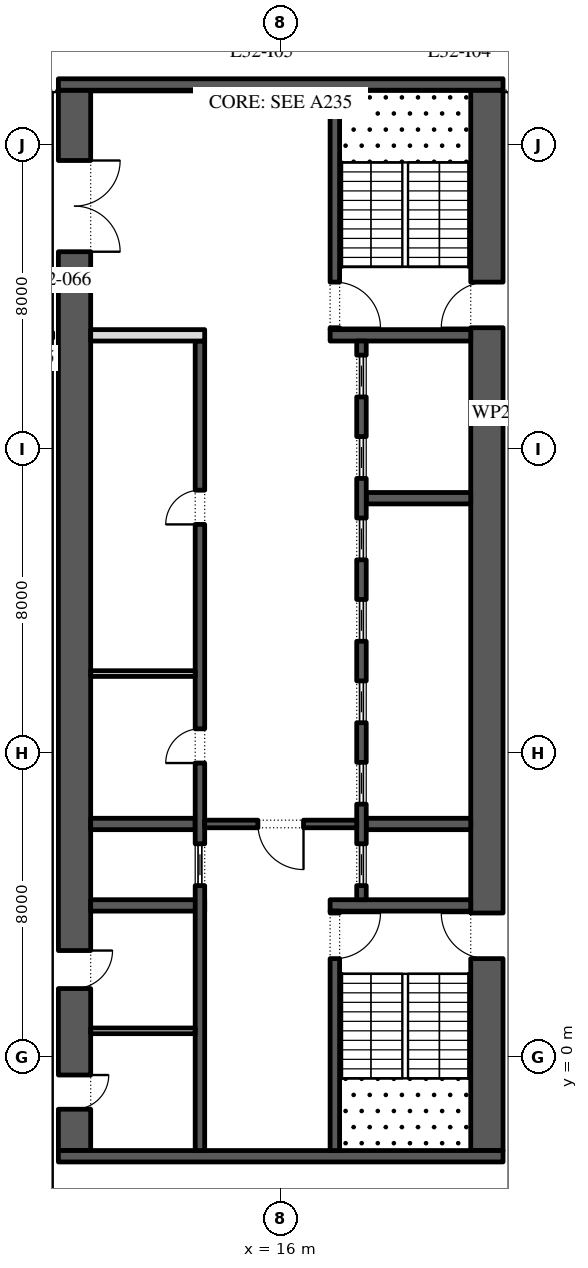
"""IFC4 building model, lengths in metres.
Left out: names, types, materials, properties, quantities, classifications, styles, units other than length and angle.
Written with IfcOpenShell. Run it as: python <this file> out.ifc"""

import sys

from ifc_helpers import new_model, si_unit, direction, frame, frame_2d, origin, place, context, subcontext, project, spatial, rectangle, extrude, element, fill, save


model = new_model("IFC4")
c1 = context("Model", 3, precision=1e-05, world=origin(), true_north=direction((0.0, 1.0)))
c2 = subcontext(c1, "Body", "Model", "MODEL_VIEW")
j1 = project(units=[si_unit("LENGTHUNIT", "METRE"), si_unit("PLANEANGLEUNIT", "RADIAN")], contexts=[c1])
p1 = place(None, origin())
s1 = spatial("IfcSite", under=j1, at=p1, CompositionType="ELEMENT")
p2 = place(p1, origin())
s2 = spatial("IfcBuilding", under=s1, at=p2, CompositionType="ELEMENT")
p3 = place(p2, frame((0.0, 0.0, 147.6)))
s3 = spatial("IfcBuildingStorey", under=s2, at=p3, CompositionType="ELEMENT", Elevation=147.6)
p4 = place(p3, frame((21.425, -2.45, 0.0), z_axis=(0.0, 0.0, 1.0), x_axis=(0.0, 1.0, 0.0)))
e1 = element("IfcWall", 1, at=p4, inside=s3, PredefinedType="SHEAR", context=c2, shape_type="SweptSolid", body=[
    extrude(rectangle(XDim=27.9, YDim=0.85, at=frame_2d((13.95, 0.0))), origin(), (0.0, 0.0, 1.0), 4.0),
])
p5 = place(p4, frame((5.05, 0.0, 0.0)))
e2 = element("IfcOpeningElement", 2, at=p5, cuts=e1, PredefinedType="OPENING", context=c2, shape_type="SweptSolid", body=[
    extrude(rectangle(XDim=1.2, YDim=2.1, at=frame_2d((0.6, 1.05))), frame((0.0, 0.435, 0.0), z_axis=(0.0, -1.0, 0.0), x_axis=(1.0, 0.0, 0.0)), (0.0, 0.0, 1.0), 0.87),
])
p6 = place(p4, frame((21.65, 0.0, 0.0)))
e3 = element("IfcOpeningElement", 3, at=p6, cuts=e1, PredefinedType="OPENING", context=c2, shape_type="SweptSolid", body=[
    extrude(rectangle(XDim=1.2, YDim=2.1, at=frame_2d((0.6, 1.05))), frame((0.0, 0.435, 0.0), z_axis=(0.0, -1.0, 0.0), x_axis=(1.0, 0.0, 0.0)), (0.0, 0.0, 1.0), 0.87),
])
p7 = place(p3, frame((10.575, -2.45, 0.0), z_axis=(0.0, 0.0, 1.0), x_axis=(0.0, 1.0, 0.0)))
e4 = element("IfcWall", 4, at=p7, inside=s3, PredefinedType="SHEAR", context=c2, shape_type="SweptSolid", body=[
    extrude(rectangle(XDim=27.9, YDim=0.85, at=frame_2d((13.95, 0.0))), origin(), (0.0, 0.0, 1.0), 4.0),
])
p8 = place(p7, frame((23.65, 0.0, 0.0)))
e5 = element("IfcOpeningElement", 5, at=p8, cuts=e4, PredefinedType="OPENING", context=c2, shape_type="SweptSolid", body=[
    extrude(rectangle(XDim=2.4, YDim=2.1, at=frame_2d((1.2, 1.05))), frame((0.0, 0.435, 0.0), z_axis=(0.0, -1.0, 0.0), x_axis=(1.0, 0.0, 0.0)), (0.0, 0.0, 1.0), 0.87),
])
p9 = place(p7, frame((1.087, 0.0, 0.0)))
e6 = element("IfcOpeningElement", 6, at=p9, cuts=e4, PredefinedType="OPENING", context=c2, shape_type="SweptSolid", body=[
    extrude(rectangle(XDim=0.9, YDim=2.1, at=frame_2d((0.45, 1.05))), frame((0.0, 0.435, 0.0), z_axis=(0.0, -1.0, 0.0), x_axis=(1.0, 0.0, 0.0)), (0.0, 0.0, 1.0), 0.87),
])
p10 = place(p7, frame((4.262, 0.0, 0.0)))
e7 = element("IfcOpeningElement", 7, at=p10, cuts=e4, PredefinedType="OPENING", context=c2, shape_type="SweptSolid", body=[
    extrude(rectangle(XDim=1.0, YDim=2.1, at=frame_2d((0.5, 1.05))), frame((0.0, 0.435, 0.0), z_axis=(0.0, -1.0, 0.0), x_axis=(1.0, 0.0, 0.0)), (0.0, 0.0, 1.0), 0.87),
])
for number, where, z_axis, x_axis in (
    (8, (10.15, -2.6, 0.0), (0.0, 0.0, 1.0), (1.0, 0.0, 0.0)),
    (9, (10.15, 25.6, 0.0), (0.0, 0.0, 1.0), (1.0, 0.0, 0.0)),
):
    element("IfcWall", number, at=place(p3, frame(where, z_axis=z_axis, x_axis=x_axis)), inside=s3, PredefinedType="SHEAR", context=c2, shape_type="SweptSolid", body=[
        extrude(rectangle(XDim=11.7, YDim=0.3, at=frame_2d((5.85, 0.0))), origin(), (0.0, 0.0, 1.0), 4.0),
    ])
p11 = place(p3, frame((17.3, 4.0, 0.0), z_axis=(0.0, 0.0, 1.0), x_axis=(1.0, 0.0, 0.0)))
e10 = element("IfcWall", 10, at=p11, inside=s3, PredefinedType="SHEAR", context=c2, shape_type="SweptSolid", body=[
    extrude(rectangle(XDim=3.7, YDim=0.3, at=frame_2d((1.85, 0.0))), origin(), (0.0, 0.0, 1.0), 4.0),
])
p12 = place(p3, frame((17.425, -2.45, 0.0), z_axis=(0.0, 0.0, 1.0), x_axis=(0.0, 1.0, 0.0)))
e11 = element("IfcWall", 11, at=p12, inside=s3, PredefinedType="SHEAR", context=c2, shape_type="SweptSolid", body=[
    extrude(rectangle(XDim=6.3, YDim=0.25, at=frame_2d((3.15, 0.0))), origin(), (0.0, 0.0, 1.0), 4.0),
])
p13 = place(p12, frame((5.05, 0.0, 0.0)))
e12 = element("IfcOpeningElement", 12, at=p13, cuts=e11, PredefinedType="OPENING", context=c2, shape_type="SweptSolid", body=[
    extrude(rectangle(XDim=1.2, YDim=2.1, at=frame_2d((0.6, 1.05))), frame((0.0, 0.135, 0.0), z_axis=(0.0, -1.0, 0.0), x_axis=(1.0, 0.0, 0.0)), (0.0, 0.0, 1.0), 0.27),
])
p14 = place(p3, frame((17.3, 19.0, 0.0), z_axis=(0.0, 0.0, 1.0), x_axis=(1.0, 0.0, 0.0)))
e13 = element("IfcWall", 13, at=p14, inside=s3, PredefinedType="SHEAR", context=c2, shape_type="SweptSolid", body=[
    extrude(rectangle(XDim=3.7, YDim=0.3, at=frame_2d((1.85, 0.0))), origin(), (0.0, 0.0, 1.0), 4.0),
])
p15 = place(p3, frame((17.425, 19.15, 0.0), z_axis=(0.0, 0.0, 1.0), x_axis=(0.0, 1.0, 0.0)))
e14 = element("IfcWall", 14, at=p15, inside=s3, PredefinedType="SHEAR", context=c2, shape_type="SweptSolid", body=[
    extrude(rectangle(XDim=6.3, YDim=0.25, at=frame_2d((3.15, 0.0))), origin(), (0.0, 0.0, 1.0), 4.0),
])
p16 = place(p15, frame((0.05, 0.0, 0.0)))
e15 = element("IfcOpeningElement", 15, at=p16, cuts=e14, PredefinedType="OPENING", context=c2, shape_type="SweptSolid", body=[
    extrude(rectangle(XDim=1.2, YDim=2.1, at=frame_2d((0.6, 1.05))), frame((0.0, 0.135, 0.0), z_axis=(0.0, -1.0, 0.0), x_axis=(1.0, 0.0, 0.0)), (0.0, 0.0, 1.0), 0.27),
])
for number, where, z_axis, x_axis in (
    (16, (18.25, 6.143, 0.0), (0.0, 0.0, 1.0), (1.0, 0.0, 0.0)),
    (17, (18.25, 14.714, 0.0), (0.0, 0.0, 1.0), (1.0, 0.0, 0.0)),
):
    element("IfcWall", number, at=place(p3, frame(where, z_axis=z_axis, x_axis=x_axis)), inside=s3, PredefinedType="SHEAR", context=c2, shape_type="SweptSolid", body=[
        extrude(rectangle(XDim=2.75, YDim=0.3, at=frame_2d((1.375, 0.0))), origin(), (0.0, 0.0, 1.0), 4.0),
    ])
p17 = place(p3, frame((18.125, 4.15, 0.0), z_axis=(0.0, 0.0, 1.0), x_axis=(0.0, 1.0, 0.0)))
e18 = element("IfcWall", 18, at=p17, inside=s3, PredefinedType="SHEAR", context=c2, shape_type="SweptSolid", body=[
    extrude(rectangle(XDim=14.7, YDim=0.25, at=frame_2d((7.35, 0.0))), origin(), (0.0, 0.0, 1.0), 4.0),
])
p18 = place(p17, frame((0.371, 0.0, 0.0)))
e19 = element("IfcOpeningElement", 19, at=p18, cuts=e18, PredefinedType="OPENING", context=c2, shape_type="SweptSolid", body=[
    extrude(rectangle(XDim=1.1, YDim=2.1, at=frame_2d((0.55, 1.05))), frame((0.0, 0.135, 0.0), z_axis=(0.0, -1.0, 0.0), x_axis=(1.0, 0.0, 0.0)), (0.0, 0.0, 1.0), 0.27),
])
p19 = place(p17, frame((2.514, 0.0, 0.0)))
e20 = element("IfcOpeningElement", 20, at=p19, cuts=e18, PredefinedType="OPENING", context=c2, shape_type="SweptSolid", body=[
    extrude(rectangle(XDim=1.1, YDim=2.1, at=frame_2d((0.55, 1.05))), frame((0.0, 0.135, 0.0), z_axis=(0.0, -1.0, 0.0), x_axis=(1.0, 0.0, 0.0)), (0.0, 0.0, 1.0), 0.27),
])
p20 = place(p17, frame((4.657, 0.0, 0.0)))
e21 = element("IfcOpeningElement", 21, at=p20, cuts=e18, PredefinedType="OPENING", context=c2, shape_type="SweptSolid", body=[
    extrude(rectangle(XDim=1.1, YDim=2.1, at=frame_2d((0.55, 1.05))), frame((0.0, 0.135, 0.0), z_axis=(0.0, -1.0, 0.0), x_axis=(1.0, 0.0, 0.0)), (0.0, 0.0, 1.0), 0.27),
])
p21 = place(p17, frame((6.8, 0.0, 0.0)))
e22 = element("IfcOpeningElement", 22, at=p21, cuts=e18, PredefinedType="OPENING", context=c2, shape_type="SweptSolid", body=[
    extrude(rectangle(XDim=1.1, YDim=2.1, at=frame_2d((0.55, 1.05))), frame((0.0, 0.135, 0.0), z_axis=(0.0, -1.0, 0.0), x_axis=(1.0, 0.0, 0.0)), (0.0, 0.0, 1.0), 0.27),
])
p22 = place(p17, frame((8.943, 0.0, 0.0)))
e23 = element("IfcOpeningElement", 23, at=p22, cuts=e18, PredefinedType="OPENING", context=c2, shape_type="SweptSolid", body=[
    extrude(rectangle(XDim=1.1, YDim=2.1, at=frame_2d((0.55, 1.05))), frame((0.0, 0.135, 0.0), z_axis=(0.0, -1.0, 0.0), x_axis=(1.0, 0.0, 0.0)), (0.0, 0.0, 1.0), 0.27),
])
p23 = place(p17, frame((11.086, 0.0, 0.0)))
e24 = element("IfcOpeningElement", 24, at=p23, cuts=e18, PredefinedType="OPENING", context=c2, shape_type="SweptSolid", body=[
    extrude(rectangle(XDim=1.1, YDim=2.1, at=frame_2d((0.55, 1.05))), frame((0.0, 0.135, 0.0), z_axis=(0.0, -1.0, 0.0), x_axis=(1.0, 0.0, 0.0)), (0.0, 0.0, 1.0), 0.27),
])
p24 = place(p17, frame((13.229, 0.0, 0.0)))
e25 = element("IfcOpeningElement", 25, at=p24, cuts=e18, PredefinedType="OPENING", context=c2, shape_type="SweptSolid", body=[
    extrude(rectangle(XDim=1.1, YDim=2.1, at=frame_2d((0.55, 1.05))), frame((0.0, 0.135, 0.0), z_axis=(0.0, -1.0, 0.0), x_axis=(1.0, 0.0, 0.0)), (0.0, 0.0, 1.0), 0.27),
])
p25 = place(p3, frame((11.0, 4.0, 0.0), z_axis=(0.0, 0.0, 1.0), x_axis=(1.0, 0.0, 0.0)))
e26 = element("IfcWall", 26, at=p25, inside=s3, PredefinedType="SHEAR", context=c2, shape_type="SweptSolid", body=[
    extrude(rectangle(XDim=3.0, YDim=0.3, at=frame_2d((1.5, 0.0))), origin(), (0.0, 0.0, 1.0), 4.0),
])
p26 = place(p3, frame((11.0, 6.143, 0.0), z_axis=(0.0, 0.0, 1.0), x_axis=(1.0, 0.0, 0.0)))
e27 = element("IfcWall", 27, at=p26, inside=s3, PredefinedType="SHEAR", context=c2, shape_type="SweptSolid", body=[
    extrude(rectangle(XDim=2.75, YDim=0.3, at=frame_2d((1.375, 0.0))), origin(), (0.0, 0.0, 1.0), 4.0),
])
p27 = place(p3, frame((13.875, -2.45, 0.0), z_axis=(0.0, 0.0, 1.0), x_axis=(0.0, 1.0, 0.0)))
e28 = element("IfcWall", 28, at=p27, inside=s3, PredefinedType="SHEAR", context=c2, shape_type="SweptSolid", body=[
    extrude(rectangle(XDim=21.3, YDim=0.25, at=frame_2d((10.65, 0.0))), origin(), (0.0, 0.0, 1.0), 4.0),
])
p28 = place(p27, frame((10.196, 0.0, 0.0)))
e29 = element("IfcOpeningElement", 29, at=p28, cuts=e28, PredefinedType="OPENING", context=c2, shape_type="SweptSolid", body=[
    extrude(rectangle(XDim=0.9, YDim=2.1, at=frame_2d((0.45, 1.05))), frame((0.0, 0.135, 0.0), z_axis=(0.0, -1.0, 0.0), x_axis=(1.0, 0.0, 0.0)), (0.0, 0.0, 1.0), 0.27),
])
p29 = place(p27, frame((16.475, 0.0, 0.0)))
e30 = element("IfcOpeningElement", 30, at=p29, cuts=e28, PredefinedType="OPENING", context=c2, shape_type="SweptSolid", body=[
    extrude(rectangle(XDim=0.9, YDim=2.1, at=frame_2d((0.45, 1.05))), frame((0.0, 0.135, 0.0), z_axis=(0.0, -1.0, 0.0), x_axis=(1.0, 0.0, 0.0)), (0.0, 0.0, 1.0), 0.27),
])
p30 = place(p27, frame((6.971, 0.0, 0.0)))
e31 = element("IfcOpeningElement", 31, at=p30, cuts=e28, PredefinedType="OPENING", context=c2, shape_type="SweptSolid", body=[
    extrude(rectangle(XDim=1.1, YDim=2.1, at=frame_2d((0.55, 1.05))), frame((0.0, 0.135, 0.0), z_axis=(0.0, -1.0, 0.0), x_axis=(1.0, 0.0, 0.0)), (0.0, 0.0, 1.0), 0.27),
])
p31 = place(p3, frame((11.0, 19.0, 0.0), z_axis=(0.0, 0.0, 1.0), x_axis=(1.0, 0.0, 0.0)))
e32 = element("IfcWall", 32, at=p31, inside=s3, PredefinedType="PARTITIONING", context=c2, shape_type="SweptSolid", body=[
    extrude(rectangle(XDim=3.0, YDim=0.3, at=frame_2d((1.5, 0.0))), origin(), (0.0, 0.0, 1.0), 4.0),
])
p32 = place(p3, frame((11.0, 10.1, 0.0), z_axis=(0.0, 0.0, 1.0), x_axis=(1.0, 0.0, 0.0)))
e33 = element("IfcWall", 33, at=p32, inside=s3, PredefinedType="PARTITIONING", context=c2, shape_type="SweptSolid", body=[
    extrude(rectangle(XDim=2.75, YDim=0.15, at=frame_2d((1.375, 0.0))), origin(), (0.0, 0.0, 1.0), 4.0),
])
p33 = place(p3, frame((14.0, 6.143, 0.0), z_axis=(0.0, 0.0, 1.0), x_axis=(1.0, 0.0, 0.0)))
e34 = element("IfcWall", 34, at=p33, inside=s3, PredefinedType="SHEAR", context=c2, shape_type="SweptSolid", body=[
    extrude(rectangle(XDim=4.0, YDim=0.2, at=frame_2d((2.0, 0.0))), origin(), (0.0, 0.0, 1.0), 4.0),
])
p34 = place(p33, frame((1.4, 0.0, 0.0)))
e35 = element("IfcOpeningElement", 35, at=p34, cuts=e34, PredefinedType="OPENING", context=c2, shape_type="SweptSolid", body=[
    extrude(rectangle(XDim=1.2, YDim=2.1, at=frame_2d((0.6, 1.05))), frame((0.0, 0.11, 0.0), z_axis=(0.0, -1.0, 0.0), x_axis=(1.0, 0.0, 0.0)), (0.0, 0.0, 1.0), 0.22),
])
p35 = place(p3, frame((11.0, 0.7, 0.0), z_axis=(0.0, 0.0, 1.0), x_axis=(1.0, 0.0, 0.0)))
e36 = element("IfcWall", 36, at=p35, inside=s3, PredefinedType="PARTITIONING", context=c2, shape_type="SweptSolid", body=[
    extrude(rectangle(XDim=2.75, YDim=0.15, at=frame_2d((1.375, 0.0))), origin(), (0.0, 0.0, 1.0), 4.0),
])
p36 = place(p18, origin())
e37 = element("IfcDoor", 37, at=p36, inside=s3, OperationType="SLIDING_TO_LEFT", PredefinedType="DOOR", context=c2, shape_type="SweptSolid", body=[
    extrude(rectangle(XDim=1.1, YDim=2.1, at=frame_2d((0.55, 1.05))), frame((0.0, 0.025, 0.0), z_axis=(0.0, -1.0, 0.0), x_axis=(1.0, 0.0, 0.0)), (0.0, 0.0, 1.0), 0.05),
])
fill(e19, e37)
p37 = place(p19, origin())
e38 = element("IfcDoor", 38, at=p37, inside=s3, OperationType="SLIDING_TO_LEFT", PredefinedType="DOOR", context=c2, shape_type="SweptSolid", body=[
    extrude(rectangle(XDim=1.1, YDim=2.1, at=frame_2d((0.55, 1.05))), frame((0.0, 0.025, 0.0), z_axis=(0.0, -1.0, 0.0), x_axis=(1.0, 0.0, 0.0)), (0.0, 0.0, 1.0), 0.05),
])
fill(e20, e38)
p38 = place(p20, origin())
e39 = element("IfcDoor", 39, at=p38, inside=s3, OperationType="SLIDING_TO_LEFT", PredefinedType="DOOR", context=c2, shape_type="SweptSolid", body=[
    extrude(rectangle(XDim=1.1, YDim=2.1, at=frame_2d((0.55, 1.05))), frame((0.0, 0.025, 0.0), z_axis=(0.0, -1.0, 0.0), x_axis=(1.0, 0.0, 0.0)), (0.0, 0.0, 1.0), 0.05),
])
fill(e21, e39)
p39 = place(p21, origin())
e40 = element("IfcDoor", 40, at=p39, inside=s3, OperationType="SLIDING_TO_LEFT", PredefinedType="DOOR", context=c2, shape_type="SweptSolid", body=[
    extrude(rectangle(XDim=1.1, YDim=2.1, at=frame_2d((0.55, 1.05))), frame((0.0, 0.025, 0.0), z_axis=(0.0, -1.0, 0.0), x_axis=(1.0, 0.0, 0.0)), (0.0, 0.0, 1.0), 0.05),
])
fill(e22, e40)
p40 = place(p22, origin())
e41 = element("IfcDoor", 41, at=p40, inside=s3, OperationType="SLIDING_TO_LEFT", PredefinedType="DOOR", context=c2, shape_type="SweptSolid", body=[
    extrude(rectangle(XDim=1.1, YDim=2.1, at=frame_2d((0.55, 1.05))), frame((0.0, 0.025, 0.0), z_axis=(0.0, -1.0, 0.0), x_axis=(1.0, 0.0, 0.0)), (0.0, 0.0, 1.0), 0.05),
])
fill(e23, e41)
p41 = place(p23, origin())
e42 = element("IfcDoor", 42, at=p41, inside=s3, OperationType="SLIDING_TO_LEFT", PredefinedType="DOOR", context=c2, shape_type="SweptSolid", body=[
    extrude(rectangle(XDim=1.1, YDim=2.1, at=frame_2d((0.55, 1.05))), frame((0.0, 0.025, 0.0), z_axis=(0.0, -1.0, 0.0), x_axis=(1.0, 0.0, 0.0)), (0.0, 0.0, 1.0), 0.05),
])
fill(e24, e42)
p42 = place(p24, origin())
e43 = element("IfcDoor", 43, at=p42, inside=s3, OperationType="SLIDING_TO_LEFT", PredefinedType="DOOR", context=c2, shape_type="SweptSolid", body=[
    extrude(rectangle(XDim=1.1, YDim=2.1, at=frame_2d((0.55, 1.05))), frame((0.0, 0.025, 0.0), z_axis=(0.0, -1.0, 0.0), x_axis=(1.0, 0.0, 0.0)), (0.0, 0.0, 1.0), 0.05),
])
fill(e25, e43)
p43 = place(p28, origin())
e44 = element("IfcDoor", 44, at=p43, inside=s3, OperationType="SINGLE_SWING_RIGHT", PredefinedType="DOOR", context=c2, shape_type="SweptSolid", body=[
    extrude(rectangle(XDim=0.9, YDim=2.1, at=frame_2d((0.45, 1.05))), frame((0.0, 0.125, 0.0), z_axis=(0.0, -1.0, 0.0), x_axis=(1.0, 0.0, 0.0)), (0.0, 0.0, 1.0), 0.05),
])
fill(e29, e44)
p44 = place(p29, origin())
e45 = element("IfcDoor", 45, at=p44, inside=s3, OperationType="SINGLE_SWING_RIGHT", PredefinedType="DOOR", context=c2, shape_type="SweptSolid", body=[
    extrude(rectangle(XDim=0.9, YDim=2.1, at=frame_2d((0.45, 1.05))), frame((0.0, 0.125, 0.0), z_axis=(0.0, -1.0, 0.0), x_axis=(1.0, 0.0, 0.0)), (0.0, 0.0, 1.0), 0.05),
])
fill(e30, e45)
p45 = place(p30, origin())
e46 = element("IfcDoor", 46, at=p45, inside=s3, OperationType="SLIDING_TO_LEFT", PredefinedType="DOOR", context=c2, shape_type="SweptSolid", body=[
    extrude(rectangle(XDim=1.1, YDim=2.1, at=frame_2d((0.55, 1.05))), frame((0.0, 0.025, 0.0), z_axis=(0.0, -1.0, 0.0), x_axis=(1.0, 0.0, 0.0)), (0.0, 0.0, 1.0), 0.05),
])
fill(e31, e46)
p46 = place(p34, frame((1.2, 0.0, 0.0), z_axis=(0.0, 0.0, 1.0), x_axis=(-1.0, 0.0, 0.0)))
e47 = element("IfcDoor", 47, at=p46, inside=s3, OperationType="SINGLE_SWING_RIGHT", PredefinedType="DOOR", context=c2, shape_type="SweptSolid", body=[
    extrude(rectangle(XDim=1.2, YDim=2.1, at=frame_2d((0.6, 1.05))), frame((0.0, 0.025, 0.0), z_axis=(0.0, -1.0, 0.0), x_axis=(1.0, 0.0, 0.0)), (0.0, 0.0, 1.0), 0.05),
])
fill(e35, e47)
p47 = place(p8, frame((2.4, 0.0, 0.0), z_axis=(0.0, 0.0, 1.0), x_axis=(-1.0, 0.0, 0.0)))
e48 = element("IfcDoor", 48, at=p47, inside=s3, OperationType="DOUBLE_DOOR_SINGLE_SWING", PredefinedType="DOOR", context=c2, shape_type="SweptSolid", body=[
    extrude(rectangle(XDim=2.4, YDim=2.1, at=frame_2d((1.2, 1.05))), frame((0.0, 0.025, 0.0), z_axis=(0.0, -1.0, 0.0), x_axis=(1.0, 0.0, 0.0)), (0.0, 0.0, 1.0), 0.05),
])
fill(e5, e48)
p48 = place(p13, frame((1.2, 0.0, 0.0), z_axis=(0.0, 0.0, 1.0), x_axis=(-1.0, 0.0, 0.0)))
e49 = element("IfcDoor", 49, at=p48, inside=s3, OperationType="SINGLE_SWING_RIGHT", PredefinedType="DOOR", context=c2, shape_type="SweptSolid", body=[
    extrude(rectangle(XDim=1.2, YDim=2.1, at=frame_2d((0.6, 1.05))), frame((0.0, 0.025, 0.0), z_axis=(0.0, -1.0, 0.0), x_axis=(1.0, 0.0, 0.0)), (0.0, 0.0, 1.0), 0.05),
])
fill(e12, e49)
p49 = place(p5, origin())
e50 = element("IfcDoor", 50, at=p49, inside=s3, OperationType="SINGLE_SWING_LEFT", PredefinedType="DOOR", context=c2, shape_type="SweptSolid", body=[
    extrude(rectangle(XDim=1.2, YDim=2.1, at=frame_2d((0.6, 1.05))), frame((0.0, 0.025, 0.0), z_axis=(0.0, -1.0, 0.0), x_axis=(1.0, 0.0, 0.0)), (0.0, 0.0, 1.0), 0.05),
])
fill(e2, e50)
p50 = place(p16, frame((1.2, 0.0, 0.0), z_axis=(0.0, 0.0, 1.0), x_axis=(-1.0, 0.0, 0.0)))
e51 = element("IfcDoor", 51, at=p50, inside=s3, OperationType="SINGLE_SWING_LEFT", PredefinedType="DOOR", context=c2, shape_type="SweptSolid", body=[
    extrude(rectangle(XDim=1.2, YDim=2.1, at=frame_2d((0.6, 1.05))), frame((0.0, 0.025, 0.0), z_axis=(0.0, -1.0, 0.0), x_axis=(1.0, 0.0, 0.0)), (0.0, 0.0, 1.0), 0.05),
])
fill(e15, e51)
p51 = place(p6, origin())
e52 = element("IfcDoor", 52, at=p51, inside=s3, OperationType="SINGLE_SWING_RIGHT", PredefinedType="DOOR", context=c2, shape_type="SweptSolid", body=[
    extrude(rectangle(XDim=1.2, YDim=2.1, at=frame_2d((0.6, 1.05))), frame((0.0, 0.025, 0.0), z_axis=(0.0, -1.0, 0.0), x_axis=(1.0, 0.0, 0.0)), (0.0, 0.0, 1.0), 0.05),
])
fill(e3, e52)
p52 = place(p9, frame((0.9, -0.8, 0.0), z_axis=(0.0, 0.0, 1.0), x_axis=(-1.0, 0.0, 0.0)))
e53 = element("IfcDoor", 53, at=p52, inside=s3, OperationType="SINGLE_SWING_RIGHT", PredefinedType="DOOR", context=c2, shape_type="SweptSolid", body=[
    extrude(rectangle(XDim=0.9, YDim=2.1, at=frame_2d((0.45, 1.05))), frame((0.0, -0.375, 0.0), z_axis=(0.0, -1.0, 0.0), x_axis=(1.0, 0.0, 0.0)), (0.0, 0.0, 1.0), 0.05),
])
fill(e6, e53)
p53 = place(p10, frame((1.0, -0.8, 0.0), z_axis=(0.0, 0.0, 1.0), x_axis=(-1.0, 0.0, 0.0)))
e54 = element("IfcDoor", 54, at=p53, inside=s3, OperationType="SINGLE_SWING_RIGHT", PredefinedType="DOOR", context=c2, shape_type="SweptSolid", body=[
    extrude(rectangle(XDim=1.0, YDim=2.1, at=frame_2d((0.5, 1.05))), frame((0.0, -0.375, 0.0), z_axis=(0.0, -1.0, 0.0), x_axis=(1.0, 0.0, 0.0)), (0.0, 0.0, 1.0), 0.05),
])
fill(e7, e54)
save(model, sys.argv[1])
